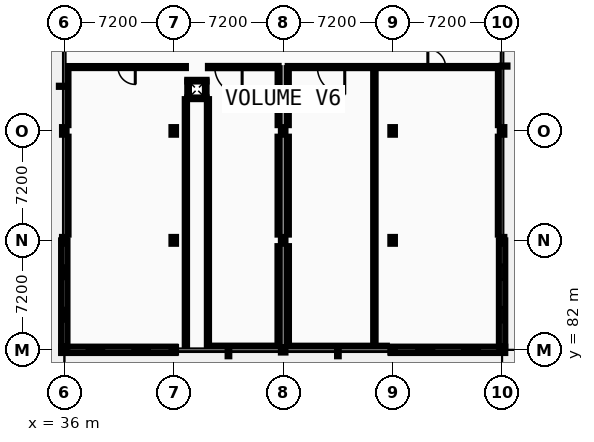
"""IFC4 building model, lengths in metres.
Left out: names, types, materials, properties, quantities, classifications, styles, units other than length and angle.
Written with IfcOpenShell. Run it as: python <this file> out.ifc"""

import sys

from ifc_helpers import new_model, si_unit, direction, frame, frame_2d, origin, origin_2d, place, context, subcontext, project, spatial, rectangle, i_section, extrude, element, fill, save


model = new_model("IFC4")
c1 = context("Model", 3, precision=1e-05, world=origin(), true_north=direction((0.0, 1.0)))
c2 = subcontext(c1, "Body", "Model", "MODEL_VIEW")
j1 = project(units=[si_unit("LENGTHUNIT", "METRE"), si_unit("PLANEANGLEUNIT", "RADIAN")], contexts=[c1])
p1 = place(None, origin())
s1 = spatial("IfcSite", under=j1, at=p1, CompositionType="ELEMENT")
p2 = place(p1, origin())
s2 = spatial("IfcBuilding", under=s1, at=p2, CompositionType="ELEMENT")
p3 = place(p2, origin())
s3 = spatial("IfcBuildingStorey", under=s2, at=p3, CompositionType="ELEMENT", Elevation=0.0)
p4 = place(p3, frame((36.0, 82.0, 0.0), z_axis=(0.0, 0.0, 1.0), x_axis=(1.0, 0.0, 0.0)))
e1 = element("IfcColumn", 1, at=p4, inside=s3, PredefinedType="COLUMN", context=c2, shape_type="SweptSolid", body=[
    extrude(i_section(OverallWidth=0.3, OverallDepth=0.36, WebThickness=0.012, FlangeThickness=0.022, FilletRadius=0.027, at=origin_2d()), origin(), (0.0, 0.0, 1.0), 5.2),
])
p5 = place(p3, frame((36.0, 89.2, 0.0), z_axis=(0.0, 0.0, 1.0), x_axis=(1.0, 0.0, 0.0)))
e2 = element("IfcColumn", 2, at=p5, inside=s3, PredefinedType="COLUMN", context=c2, shape_type="SweptSolid", body=[
    extrude(i_section(OverallWidth=0.3, OverallDepth=0.45, WebThickness=0.014, FlangeThickness=0.026, FilletRadius=0.027, at=origin_2d()), origin(), (0.0, 0.0, 1.0), 5.2),
])
p6 = place(p3, frame((36.0, 96.4, 0.0), z_axis=(0.0, 0.0, 1.0), x_axis=(1.0, 0.0, 0.0)))
e3 = element("IfcColumn", 3, at=p6, inside=s3, PredefinedType="COLUMN", context=c2, shape_type="SweptSolid", body=[
    extrude(i_section(OverallWidth=0.3, OverallDepth=0.5, WebThickness=0.014, FlangeThickness=0.028, FilletRadius=0.027, at=origin_2d()), origin(), (0.0, 0.0, 1.0), 5.2),
])
p7 = place(p3, frame((43.2, 82.0, 0.0), z_axis=(0.0, 0.0, 1.0), x_axis=(1.0, 0.0, 0.0)))
e4 = element("IfcColumn", 4, at=p7, inside=s3, PredefinedType="COLUMN", context=c2, shape_type="SweptSolid", body=[
    extrude(i_section(OverallWidth=0.3, OverallDepth=0.36, WebThickness=0.012, FlangeThickness=0.022, FilletRadius=0.027, at=origin_2d()), origin(), (0.0, 0.0, 1.0), 5.2),
])
p8 = place(p3, frame((43.2, 89.2, 0.0), z_axis=(0.0, 0.0, 1.0), x_axis=(1.0, 0.0, 0.0)))
e5 = element("IfcColumn", 5, at=p8, inside=s3, PredefinedType="COLUMN", context=c2, shape_type="SweptSolid", body=[
    extrude(i_section(OverallWidth=0.3, OverallDepth=0.45, WebThickness=0.014, FlangeThickness=0.026, FilletRadius=0.027, at=origin_2d()), origin(), (0.0, 0.0, 1.0), 5.2),
])
p9 = place(p3, frame((43.2, 96.4, 0.0), z_axis=(0.0, 0.0, 1.0), x_axis=(1.0, 0.0, 0.0)))
e6 = element("IfcColumn", 6, at=p9, inside=s3, PredefinedType="COLUMN", context=c2, shape_type="SweptSolid", body=[
    extrude(i_section(OverallWidth=0.3, OverallDepth=0.5, WebThickness=0.014, FlangeThickness=0.028, FilletRadius=0.027, at=origin_2d()), origin(), (0.0, 0.0, 1.0), 5.2),
])
p10 = place(p3, frame((50.4, 82.0, 0.0), z_axis=(0.0, 0.0, 1.0), x_axis=(1.0, 0.0, 0.0)))
e7 = element("IfcColumn", 7, at=p10, inside=s3, PredefinedType="COLUMN", context=c2, shape_type="SweptSolid", body=[
    extrude(i_section(OverallWidth=0.3, OverallDepth=0.36, WebThickness=0.012, FlangeThickness=0.022, FilletRadius=0.027, at=origin_2d()), origin(), (0.0, 0.0, 1.0), 5.2),
])
p11 = place(p3, frame((50.4, 89.2, 0.0), z_axis=(0.0, 0.0, 1.0), x_axis=(1.0, 0.0, 0.0)))
e8 = element("IfcColumn", 8, at=p11, inside=s3, PredefinedType="COLUMN", context=c2, shape_type="SweptSolid", body=[
    extrude(i_section(OverallWidth=0.3, OverallDepth=0.45, WebThickness=0.014, FlangeThickness=0.026, FilletRadius=0.027, at=origin_2d()), origin(), (0.0, 0.0, 1.0), 5.2),
])
p12 = place(p3, frame((50.4, 96.4, 0.0), z_axis=(0.0, 0.0, 1.0), x_axis=(1.0, 0.0, 0.0)))
e9 = element("IfcColumn", 9, at=p12, inside=s3, PredefinedType="COLUMN", context=c2, shape_type="SweptSolid", body=[
    extrude(i_section(OverallWidth=0.3, OverallDepth=0.5, WebThickness=0.014, FlangeThickness=0.028, FilletRadius=0.027, at=origin_2d()), origin(), (0.0, 0.0, 1.0), 5.2),
])
p13 = place(p3, frame((57.6, 82.0, 0.0), z_axis=(0.0, 0.0, 1.0), x_axis=(1.0, 0.0, 0.0)))
e10 = element("IfcColumn", 10, at=p13, inside=s3, PredefinedType="COLUMN", context=c2, shape_type="SweptSolid", body=[
    extrude(i_section(OverallWidth=0.3, OverallDepth=0.36, WebThickness=0.012, FlangeThickness=0.022, FilletRadius=0.027, at=origin_2d()), origin(), (0.0, 0.0, 1.0), 5.2),
])
p14 = place(p3, frame((57.6, 89.2, 0.0), z_axis=(0.0, 0.0, 1.0), x_axis=(1.0, 0.0, 0.0)))
e11 = element("IfcColumn", 11, at=p14, inside=s3, PredefinedType="COLUMN", context=c2, shape_type="SweptSolid", body=[
    extrude(i_section(OverallWidth=0.3, OverallDepth=0.45, WebThickness=0.014, FlangeThickness=0.026, FilletRadius=0.027, at=origin_2d()), origin(), (0.0, 0.0, 1.0), 5.2),
])
p15 = place(p3, frame((57.6, 96.4, 0.0), z_axis=(0.0, 0.0, 1.0), x_axis=(1.0, 0.0, 0.0)))
e12 = element("IfcColumn", 12, at=p15, inside=s3, PredefinedType="COLUMN", context=c2, shape_type="SweptSolid", body=[
    extrude(i_section(OverallWidth=0.3, OverallDepth=0.5, WebThickness=0.014, FlangeThickness=0.028, FilletRadius=0.027, at=origin_2d()), origin(), (0.0, 0.0, 1.0), 5.2),
])
p16 = place(p3, frame((64.8, 82.0, 0.0), z_axis=(0.0, 0.0, 1.0), x_axis=(1.0, 0.0, 0.0)))
e13 = element("IfcColumn", 13, at=p16, inside=s3, PredefinedType="COLUMN", context=c2, shape_type="SweptSolid", body=[
    extrude(i_section(OverallWidth=0.3, OverallDepth=0.36, WebThickness=0.012, FlangeThickness=0.022, FilletRadius=0.027, at=origin_2d()), origin(), (0.0, 0.0, 1.0), 5.2),
])
p17 = place(p3, frame((64.8, 89.2, 0.0), z_axis=(0.0, 0.0, 1.0), x_axis=(1.0, 0.0, 0.0)))
e14 = element("IfcColumn", 14, at=p17, inside=s3, PredefinedType="COLUMN", context=c2, shape_type="SweptSolid", body=[
    extrude(i_section(OverallWidth=0.3, OverallDepth=0.45, WebThickness=0.014, FlangeThickness=0.026, FilletRadius=0.027, at=origin_2d()), origin(), (0.0, 0.0, 1.0), 5.2),
])
p18 = place(p3, frame((64.8, 96.4, 0.0), z_axis=(0.0, 0.0, 1.0), x_axis=(1.0, 0.0, 0.0)))
e15 = element("IfcColumn", 15, at=p18, inside=s3, PredefinedType="COLUMN", context=c2, shape_type="SweptSolid", body=[
    extrude(i_section(OverallWidth=0.3, OverallDepth=0.5, WebThickness=0.014, FlangeThickness=0.028, FilletRadius=0.027, at=origin_2d()), origin(), (0.0, 0.0, 1.0), 5.2),
])
p19 = place(p3, frame((35.79, 82.0, 0.0), z_axis=(0.0, 0.0, 1.0), x_axis=(1.0, 0.0, 0.0)))
e16 = element("IfcWall", 16, at=p19, inside=s3, PredefinedType="STANDARD", context=c2, shape_type="SweptSolid", body=[
    extrude(rectangle(XDim=7.52, YDim=0.42, at=frame_2d((3.76, 0.0))), origin(), (0.0, 0.0, 1.0), 4.665),
])
p20 = place(p19, frame((1.707, 0.0, 0.95)))
e17 = element("IfcOpeningElement", 17, at=p20, cuts=e16, PredefinedType="OPENING", context=c2, shape_type="SweptSolid", body=[
    extrude(rectangle(XDim=1.098, YDim=1.332, at=frame_2d((0.549, 0.666))), frame((0.0, 0.22, 0.0), z_axis=(0.0, -1.0, 0.0), x_axis=(1.0, 0.0, 0.0)), (0.0, 0.0, 1.0), 0.44),
])
p21 = place(p19, frame((4.715, 0.0, 0.95)))
e18 = element("IfcOpeningElement", 18, at=p21, cuts=e16, PredefinedType="OPENING", context=c2, shape_type="SweptSolid", body=[
    extrude(rectangle(XDim=1.098, YDim=1.332, at=frame_2d((0.549, 0.666))), frame((0.0, 0.22, 0.0), z_axis=(0.0, -1.0, 0.0), x_axis=(1.0, 0.0, 0.0)), (0.0, 0.0, 1.0), 0.44),
])
p22 = place(p3, frame((57.49, 82.0, 0.0), z_axis=(0.0, 0.0, 1.0), x_axis=(1.0, 0.0, 0.0)))
e19 = element("IfcWall", 19, at=p22, inside=s3, PredefinedType="STANDARD", context=c2, shape_type="SweptSolid", body=[
    extrude(rectangle(XDim=7.52, YDim=0.42, at=frame_2d((3.76, 0.0))), origin(), (0.0, 0.0, 1.0), 4.665),
])
p23 = place(p22, frame((1.69, 0.0, 0.95)))
e20 = element("IfcOpeningElement", 20, at=p23, cuts=e19, PredefinedType="OPENING", context=c2, shape_type="SweptSolid", body=[
    extrude(rectangle(XDim=1.132, YDim=1.332, at=frame_2d((0.566, 0.666))), frame((0.0, 0.22, 0.0), z_axis=(0.0, -1.0, 0.0), x_axis=(1.0, 0.0, 0.0)), (0.0, 0.0, 1.0), 0.44),
])
p24 = place(p22, frame((4.698, 0.0, 0.95)))
e21 = element("IfcOpeningElement", 21, at=p24, cuts=e19, PredefinedType="OPENING", context=c2, shape_type="SweptSolid", body=[
    extrude(rectangle(XDim=1.132, YDim=1.332, at=frame_2d((0.566, 0.666))), frame((0.0, 0.22, 0.0), z_axis=(0.0, -1.0, 0.0), x_axis=(1.0, 0.0, 0.0)), (0.0, 0.0, 1.0), 0.44),
])
p25 = place(p3, frame((36.0, 89.2, 0.0), z_axis=(0.0, 0.0, 1.0), x_axis=(0.0, -1.0, 0.0)))
e22 = element("IfcWall", 22, at=p25, inside=s3, PredefinedType="STANDARD", context=c2, shape_type="SweptSolid", body=[
    extrude(rectangle(XDim=6.99, YDim=0.42, at=frame_2d((3.495, 0.0))), origin(), (0.0, 0.0, 1.0), 4.595),
])
p26 = place(p25, frame((1.667, 0.0, 0.95)))
e23 = element("IfcOpeningElement", 23, at=p26, cuts=e22, PredefinedType="OPENING", context=c2, shape_type="SweptSolid", body=[
    extrude(rectangle(XDim=0.86, YDim=1.368, at=frame_2d((0.43, 0.684))), frame((0.0, 0.22, 0.0), z_axis=(0.0, -1.0, 0.0), x_axis=(1.0, 0.0, 0.0)), (0.0, 0.0, 1.0), 0.44),
])
p27 = place(p25, frame((4.463, 0.0, 0.95)))
e24 = element("IfcOpeningElement", 24, at=p27, cuts=e22, PredefinedType="OPENING", context=c2, shape_type="SweptSolid", body=[
    extrude(rectangle(XDim=0.86, YDim=1.368, at=frame_2d((0.43, 0.684))), frame((0.0, 0.22, 0.0), z_axis=(0.0, -1.0, 0.0), x_axis=(1.0, 0.0, 0.0)), (0.0, 0.0, 1.0), 0.44),
])
p28 = place(p3, frame((64.8, 82.21, 0.0), z_axis=(0.0, 0.0, 1.0), x_axis=(0.0, 1.0, 0.0)))
e25 = element("IfcWall", 25, at=p28, inside=s3, PredefinedType="STANDARD", context=c2, shape_type="SweptSolid", body=[
    extrude(rectangle(XDim=6.99, YDim=0.42, at=frame_2d((3.495, 0.0))), origin(), (0.0, 0.0, 1.0), 4.595),
])
p29 = place(p28, frame((1.616, 0.0, 0.95)))
e26 = element("IfcOpeningElement", 26, at=p29, cuts=e25, PredefinedType="OPENING", context=c2, shape_type="SweptSolid", body=[
    extrude(rectangle(XDim=0.962, YDim=1.368, at=frame_2d((0.481, 0.684))), frame((0.0, 0.22, 0.0), z_axis=(0.0, -1.0, 0.0), x_axis=(1.0, 0.0, 0.0)), (0.0, 0.0, 1.0), 0.44),
])
p30 = place(p28, frame((4.412, 0.0, 0.95)))
e27 = element("IfcOpeningElement", 27, at=p30, cuts=e25, PredefinedType="OPENING", context=c2, shape_type="SweptSolid", body=[
    extrude(rectangle(XDim=0.962, YDim=1.368, at=frame_2d((0.481, 0.684))), frame((0.0, 0.22, 0.0), z_axis=(0.0, -1.0, 0.0), x_axis=(1.0, 0.0, 0.0)), (0.0, 0.0, 1.0), 0.44),
])
for number, where, z_axis, x_axis in (
    (28, (44.09, 98.545, 0.0), (0.0, 0.0, 1.0), (1.0, 0.0, 0.0)),
    (29, (44.09, 99.705, 0.0), (0.0, 0.0, 1.0), (1.0, 0.0, 0.0)),
):
    element("IfcWall", number, at=place(p3, frame(where, z_axis=z_axis, x_axis=x_axis)), inside=s3, PredefinedType="PARTITIONING", context=c2, shape_type="SweptSolid", body=[
        extrude(rectangle(XDim=1.27, YDim=0.11, at=frame_2d((0.635, 0.0))), origin(), (0.0, 0.0, 1.0), 4.97),
    ])
for number, where, z_axis, x_axis in (
    (30, (44.145, 98.6, 0.0), (0.0, 0.0, 1.0), (0.0, 1.0, 0.0)),
    (31, (45.305, 98.6, 0.0), (0.0, 0.0, 1.0), (0.0, 1.0, 0.0)),
):
    element("IfcWall", number, at=place(p3, frame(where, z_axis=z_axis, x_axis=x_axis)), inside=s3, PredefinedType="PARTITIONING", context=c2, shape_type="SweptSolid", body=[
        extrude(rectangle(XDim=1.05, YDim=0.11, at=frame_2d((0.525, 0.0))), origin(), (0.0, 0.0, 1.0), 4.97),
    ])
p31 = place(p3, frame((45.45, 82.2, 0.0), z_axis=(0.0, 0.0, 1.0), x_axis=(1.0, 0.0, 0.0)))
e32 = element("IfcWall", 32, at=p31, inside=s3, PredefinedType="PARTITIONING", context=c2, shape_type="SweptSolid", body=[
    extrude(rectangle(XDim=4.57, YDim=0.15, at=frame_2d((2.285, 0.0))), origin(), (0.0, 0.0, 1.0), 4.665),
])
p32 = place(p3, frame((50.78, 82.2, 0.0), z_axis=(0.0, 0.0, 1.0), x_axis=(1.0, 0.0, 0.0)))
e33 = element("IfcWall", 33, at=p32, inside=s3, PredefinedType="PARTITIONING", context=c2, shape_type="SweptSolid", body=[
    extrude(rectangle(XDim=6.44, YDim=0.142, at=frame_2d((3.22, 0.0))), origin(), (0.0, 0.0, 1.0), 4.665),
])
p33 = place(p3, frame((36.2, 100.6, 0.0), z_axis=(0.0, 0.0, 1.0), x_axis=(1.0, 0.0, 0.0)))
e34 = element("IfcWall", 34, at=p33, inside=s3, PredefinedType="PARTITIONING", context=c2, shape_type="SweptSolid", body=[
    extrude(rectangle(XDim=7.8, YDim=0.135, at=frame_2d((3.9, 0.0))), origin(), (0.0, 0.0, 1.0), 4.97),
])
p34 = place(p33, frame((3.33, 0.0, 0.0)))
e35 = element("IfcOpeningElement", 35, at=p34, cuts=e34, PredefinedType="OPENING", context=c2, shape_type="SweptSolid", body=[
    extrude(rectangle(XDim=1.14, YDim=2.096, at=frame_2d((0.57, 1.048))), frame((0.0, 0.078, 0.0), z_axis=(0.0, -1.0, 0.0), x_axis=(1.0, 0.0, 0.0)), (0.0, 0.0, 1.0), 0.155),
])
p35 = place(p3, frame((45.45, 100.6, 0.0), z_axis=(0.0, 0.0, 1.0), x_axis=(1.0, 0.0, 0.0)))
e36 = element("IfcWall", 36, at=p35, inside=s3, PredefinedType="PARTITIONING", context=c2, shape_type="SweptSolid", body=[
    extrude(rectangle(XDim=4.65, YDim=0.15, at=frame_2d((2.325, 0.0))), origin(), (0.0, 0.0, 1.0), 4.97),
])
p36 = place(p35, frame((0.45, 0.0, 0.0)))
e37 = element("IfcOpeningElement", 37, at=p36, cuts=e36, PredefinedType="OPENING", context=c2, shape_type="SweptSolid", body=[
    extrude(rectangle(XDim=1.8, YDim=2.3, at=frame_2d((0.9, 1.15))), frame((0.0, 0.085, 0.0), z_axis=(0.0, -1.0, 0.0), x_axis=(1.0, 0.0, 0.0)), (0.0, 0.0, 1.0), 0.17),
])
p37 = place(p3, frame((50.7, 100.6, 0.0), z_axis=(0.0, 0.0, 1.0), x_axis=(1.0, 0.0, 0.0)))
e38 = element("IfcWall", 38, at=p37, inside=s3, PredefinedType="PARTITIONING", context=c2, shape_type="SweptSolid", body=[
    extrude(rectangle(XDim=13.9, YDim=0.142, at=frame_2d((6.95, 0.0))), origin(), (0.0, 0.0, 1.0), 4.97),
])
p38 = place(p37, frame((1.95, 0.0, 0.0)))
e39 = element("IfcOpeningElement", 39, at=p38, cuts=e38, PredefinedType="OPENING", context=c2, shape_type="SweptSolid", body=[
    extrude(rectangle(XDim=1.8, YDim=2.3, at=frame_2d((0.9, 1.15))), frame((0.0, 0.081, 0.0), z_axis=(0.0, -1.0, 0.0), x_axis=(1.0, 0.0, 0.0)), (0.0, 0.0, 1.0), 0.162),
])
p39 = place(p37, frame((9.217, 0.0, 0.0)))
e40 = element("IfcOpeningElement", 40, at=p39, cuts=e38, PredefinedType="OPENING", context=c2, shape_type="SweptSolid", body=[
    extrude(rectangle(XDim=1.166, YDim=2.096, at=frame_2d((0.583, 1.048))), frame((0.0, 0.081, 0.0), z_axis=(0.0, -1.0, 0.0), x_axis=(1.0, 0.0, 0.0)), (0.0, 0.0, 1.0), 0.162),
])
p40 = place(p3, frame((36.2, 89.58, 0.0), z_axis=(0.0, 0.0, 1.0), x_axis=(0.0, 1.0, 0.0)))
e41 = element("IfcWall", 41, at=p40, inside=s3, PredefinedType="PARTITIONING", context=c2, shape_type="SweptSolid", body=[
    extrude(rectangle(XDim=6.44, YDim=0.16, at=frame_2d((3.22, 0.0))), origin(), (0.0, 0.0, 1.0), 4.595),
])
p41 = place(p3, frame((36.2, 96.78, 0.0), z_axis=(0.0, 0.0, 1.0), x_axis=(0.0, 1.0, 0.0)))
e42 = element("IfcWall", 42, at=p41, inside=s3, PredefinedType="PARTITIONING", context=c2, shape_type="SweptSolid", body=[
    extrude(rectangle(XDim=3.752, YDim=0.15, at=frame_2d((1.876, 0.0))), origin(), (0.0, 0.0, 1.0), 4.595),
])
p42 = place(p3, frame((44.0, 82.2, 0.0), z_axis=(0.0, 0.0, 1.0), x_axis=(0.0, 1.0, 0.0)))
e43 = element("IfcWall", 43, at=p42, inside=s3, PredefinedType="PARTITIONING", context=c2, shape_type="SweptSolid", body=[
    extrude(rectangle(XDim=16.29, YDim=0.15, at=frame_2d((8.145, 0.0))), origin(), (0.0, 0.0, 1.0), 4.97),
])
p43 = place(p3, frame((45.45, 82.275, 0.0), z_axis=(0.0, 0.0, 1.0), x_axis=(0.0, 1.0, 0.0)))
e44 = element("IfcWall", 44, at=p43, inside=s3, PredefinedType="PARTITIONING", context=c2, shape_type="SweptSolid", body=[
    extrude(rectangle(XDim=16.215, YDim=0.142, at=frame_2d((8.107, 0.0))), origin(), (0.0, 0.0, 1.0), 4.655),
])
p44 = place(p3, frame((50.1, 82.38, 0.0), z_axis=(0.0, 0.0, 1.0), x_axis=(0.0, 1.0, 0.0)))
e45 = element("IfcWall", 45, at=p44, inside=s3, PredefinedType="PARTITIONING", context=c2, shape_type="SweptSolid", body=[
    extrude(rectangle(XDim=6.44, YDim=0.15, at=frame_2d((3.22, 0.0))), origin(), (0.0, 0.0, 1.0), 4.665),
])
p45 = place(p3, frame((50.1, 89.58, 0.0), z_axis=(0.0, 0.0, 1.0), x_axis=(0.0, 1.0, 0.0)))
e46 = element("IfcWall", 46, at=p45, inside=s3, PredefinedType="PARTITIONING", context=c2, shape_type="SweptSolid", body=[
    extrude(rectangle(XDim=6.44, YDim=0.142, at=frame_2d((3.22, 0.0))), origin(), (0.0, 0.0, 1.0), 4.665),
])
p46 = place(p3, frame((50.1, 96.78, 0.0), z_axis=(0.0, 0.0, 1.0), x_axis=(0.0, 1.0, 0.0)))
e47 = element("IfcWall", 47, at=p46, inside=s3, PredefinedType="PARTITIONING", context=c2, shape_type="SweptSolid", body=[
    extrude(rectangle(XDim=3.745, YDim=0.135, at=frame_2d((1.873, 0.0))), origin(), (0.0, 0.0, 1.0), 4.97),
])
p47 = place(p3, frame((50.7, 82.38, 0.0), z_axis=(0.0, 0.0, 1.0), x_axis=(0.0, 1.0, 0.0)))
e48 = element("IfcWall", 48, at=p47, inside=s3, PredefinedType="PARTITIONING", context=c2, shape_type="SweptSolid", body=[
    extrude(rectangle(XDim=6.44, YDim=0.16, at=frame_2d((3.22, 0.0))), origin(), (0.0, 0.0, 1.0), 4.665),
])
p48 = place(p3, frame((50.7, 89.58, 0.0), z_axis=(0.0, 0.0, 1.0), x_axis=(0.0, 1.0, 0.0)))
e49 = element("IfcWall", 49, at=p48, inside=s3, PredefinedType="PARTITIONING", context=c2, shape_type="SweptSolid", body=[
    extrude(rectangle(XDim=6.44, YDim=0.15, at=frame_2d((3.22, 0.0))), origin(), (0.0, 0.0, 1.0), 4.665),
])
p49 = place(p3, frame((50.7, 96.78, 0.0), z_axis=(0.0, 0.0, 1.0), x_axis=(0.0, 1.0, 0.0)))
e50 = element("IfcWall", 50, at=p49, inside=s3, PredefinedType="PARTITIONING", context=c2, shape_type="SweptSolid", body=[
    extrude(rectangle(XDim=3.749, YDim=0.142, at=frame_2d((1.875, 0.0))), origin(), (0.0, 0.0, 1.0), 4.665),
])
p50 = place(p3, frame((56.4, 82.271, 0.0), z_axis=(0.0, 0.0, 1.0), x_axis=(0.0, 1.0, 0.0)))
e51 = element("IfcWall", 51, at=p50, inside=s3, PredefinedType="PARTITIONING", context=c2, shape_type="SweptSolid", body=[
    extrude(rectangle(XDim=18.258, YDim=0.16, at=frame_2d((9.129, 0.0))), origin(), (0.0, 0.0, 1.0), 4.97),
])
p51 = place(p3, frame((64.6, 89.58, 0.0), z_axis=(0.0, 0.0, 1.0), x_axis=(0.0, 1.0, 0.0)))
e52 = element("IfcWall", 52, at=p51, inside=s3, PredefinedType="PARTITIONING", context=c2, shape_type="SweptSolid", body=[
    extrude(rectangle(XDim=6.44, YDim=0.16, at=frame_2d((3.22, 0.0))), origin(), (0.0, 0.0, 1.0), 4.595),
])
p52 = place(p3, frame((64.6, 96.78, 0.0), z_axis=(0.0, 0.0, 1.0), x_axis=(0.0, 1.0, 0.0)))
e53 = element("IfcWall", 53, at=p52, inside=s3, PredefinedType="PARTITIONING", context=c2, shape_type="SweptSolid", body=[
    extrude(rectangle(XDim=3.749, YDim=0.15, at=frame_2d((1.875, 0.0))), origin(), (0.0, 0.0, 1.0), 4.595),
])
p53 = place(p20, origin())
e54 = element("IfcWindow", 54, at=p53, inside=s3, PartitioningType="SINGLE_PANEL", PredefinedType="WINDOW", context=c2, shape_type="SweptSolid", body=[
    extrude(rectangle(XDim=1.098, YDim=1.332, at=frame_2d((0.549, 0.666))), frame((0.0, 0.03, 0.0), z_axis=(0.0, -1.0, 0.0), x_axis=(1.0, 0.0, 0.0)), (0.0, 0.0, 1.0), 0.06),
])
fill(e17, e54)
p54 = place(p21, origin())
e55 = element("IfcWindow", 55, at=p54, inside=s3, PartitioningType="SINGLE_PANEL", PredefinedType="WINDOW", context=c2, shape_type="SweptSolid", body=[
    extrude(rectangle(XDim=1.098, YDim=1.332, at=frame_2d((0.549, 0.666))), frame((0.0, 0.03, 0.0), z_axis=(0.0, -1.0, 0.0), x_axis=(1.0, 0.0, 0.0)), (0.0, 0.0, 1.0), 0.06),
])
fill(e18, e55)
p55 = place(p23, origin())
e56 = element("IfcWindow", 56, at=p55, inside=s3, PartitioningType="SINGLE_PANEL", PredefinedType="WINDOW", context=c2, shape_type="SweptSolid", body=[
    extrude(rectangle(XDim=1.132, YDim=1.332, at=frame_2d((0.566, 0.666))), frame((0.0, 0.03, 0.0), z_axis=(0.0, -1.0, 0.0), x_axis=(1.0, 0.0, 0.0)), (0.0, 0.0, 1.0), 0.06),
])
fill(e20, e56)
p56 = place(p24, origin())
e57 = element("IfcWindow", 57, at=p56, inside=s3, PartitioningType="SINGLE_PANEL", PredefinedType="WINDOW", context=c2, shape_type="SweptSolid", body=[
    extrude(rectangle(XDim=1.132, YDim=1.332, at=frame_2d((0.566, 0.666))), frame((0.0, 0.03, 0.0), z_axis=(0.0, -1.0, 0.0), x_axis=(1.0, 0.0, 0.0)), (0.0, 0.0, 1.0), 0.06),
])
fill(e21, e57)
p57 = place(p26, origin())
e58 = element("IfcWindow", 58, at=p57, inside=s3, PartitioningType="SINGLE_PANEL", PredefinedType="WINDOW", context=c2, shape_type="SweptSolid", body=[
    extrude(rectangle(XDim=0.86, YDim=1.368, at=frame_2d((0.43, 0.684))), frame((0.0, 0.03, 0.0), z_axis=(0.0, -1.0, 0.0), x_axis=(1.0, 0.0, 0.0)), (0.0, 0.0, 1.0), 0.06),
])
fill(e23, e58)
p58 = place(p27, origin())
e59 = element("IfcWindow", 59, at=p58, inside=s3, PartitioningType="SINGLE_PANEL", PredefinedType="WINDOW", context=c2, shape_type="SweptSolid", body=[
    extrude(rectangle(XDim=0.86, YDim=1.368, at=frame_2d((0.43, 0.684))), frame((0.0, 0.03, 0.0), z_axis=(0.0, -1.0, 0.0), x_axis=(1.0, 0.0, 0.0)), (0.0, 0.0, 1.0), 0.06),
])
fill(e24, e59)
p59 = place(p29, origin())
e60 = element("IfcWindow", 60, at=p59, inside=s3, PartitioningType="SINGLE_PANEL", PredefinedType="WINDOW", context=c2, shape_type="SweptSolid", body=[
    extrude(rectangle(XDim=0.962, YDim=1.368, at=frame_2d((0.481, 0.684))), frame((0.0, 0.03, 0.0), z_axis=(0.0, -1.0, 0.0), x_axis=(1.0, 0.0, 0.0)), (0.0, 0.0, 1.0), 0.06),
])
fill(e26, e60)
p60 = place(p30, origin())
e61 = element("IfcWindow", 61, at=p60, inside=s3, PartitioningType="SINGLE_PANEL", PredefinedType="WINDOW", context=c2, shape_type="SweptSolid", body=[
    extrude(rectangle(XDim=0.962, YDim=1.368, at=frame_2d((0.481, 0.684))), frame((0.0, 0.03, 0.0), z_axis=(0.0, -1.0, 0.0), x_axis=(1.0, 0.0, 0.0)), (0.0, 0.0, 1.0), 0.06),
])
fill(e27, e61)
p61 = place(p36, origin())
e62 = element("IfcDoor", 62, at=p61, inside=s3, OperationType="DOUBLE_DOOR_SINGLE_SWING", PredefinedType="DOOR", context=c2, shape_type="SweptSolid", body=[
    extrude(rectangle(XDim=1.8, YDim=2.3, at=frame_2d((0.9, 1.15))), frame((0.0, 0.025, 0.0), z_axis=(0.0, -1.0, 0.0), x_axis=(1.0, 0.0, 0.0)), (0.0, 0.0, 1.0), 0.05),
])
fill(e37, e62)
p62 = place(p38, origin())
e63 = element("IfcDoor", 63, at=p62, inside=s3, OperationType="DOUBLE_DOOR_SINGLE_SWING", PredefinedType="DOOR", context=c2, shape_type="SweptSolid", body=[
    extrude(rectangle(XDim=1.8, YDim=2.3, at=frame_2d((0.9, 1.15))), frame((0.0, 0.025, 0.0), z_axis=(0.0, -1.0, 0.0), x_axis=(1.0, 0.0, 0.0)), (0.0, 0.0, 1.0), 0.05),
])
fill(e39, e63)
p63 = place(p34, origin())
e64 = element("IfcDoor", 64, at=p63, inside=s3, OperationType="SINGLE_SWING_RIGHT", PredefinedType="DOOR", context=c2, shape_type="SweptSolid", body=[
    extrude(rectangle(XDim=1.14, YDim=2.096, at=frame_2d((0.57, 1.048))), frame((0.0, 0.025, 0.0), z_axis=(0.0, -1.0, 0.0), x_axis=(1.0, 0.0, 0.0)), (0.0, 0.0, 1.0), 0.05),
])
fill(e35, e64)
p64 = place(p39, origin())
e65 = element("IfcDoor", 65, at=p64, inside=s3, OperationType="SINGLE_SWING_LEFT", PredefinedType="DOOR", context=c2, shape_type="SweptSolid", body=[
    extrude(rectangle(XDim=1.166, YDim=2.096, at=frame_2d((0.583, 1.048))), frame((0.0, 0.025, 0.0), z_axis=(0.0, -1.0, 0.0), x_axis=(1.0, 0.0, 0.0)), (0.0, 0.0, 1.0), 0.05),
])
fill(e40, e65)
save(model, sys.argv[1])
